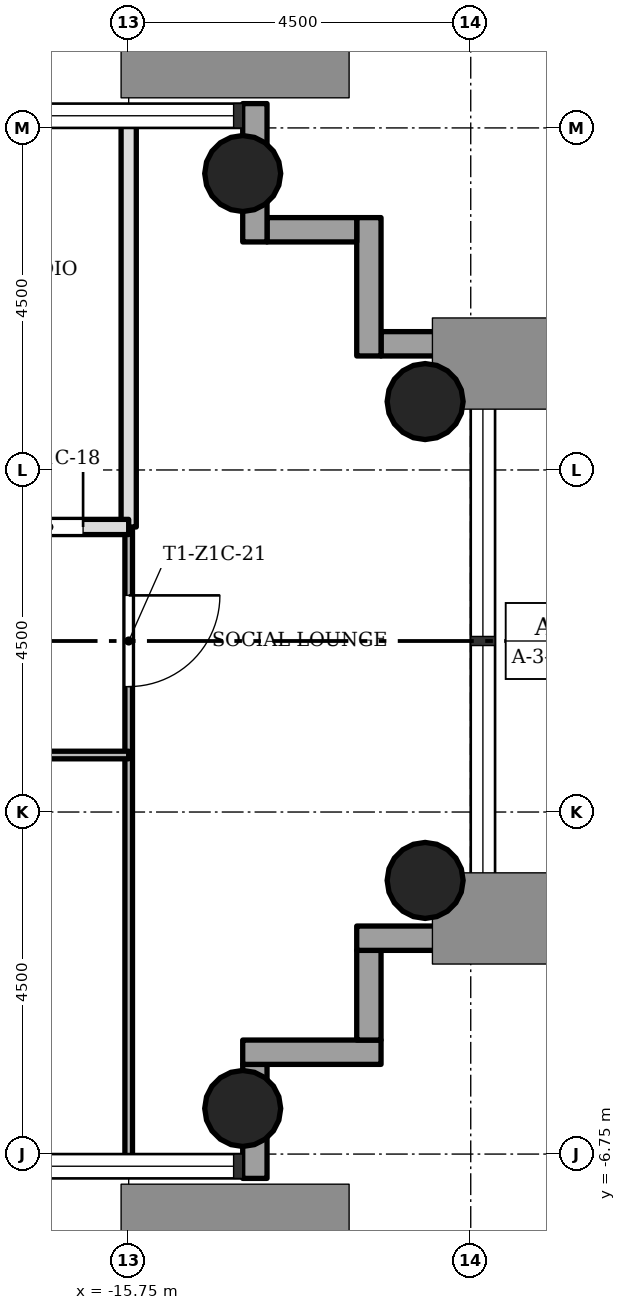
"""IFC4 building model, lengths in metres.
Left out: names, types, materials, properties, quantities, classifications, styles, units other than length and angle.
Written with IfcOpenShell. Run it as: python <this file> out.ifc"""

import sys

from ifc_helpers import new_model, si_unit, direction, frame, frame_2d, origin, origin_2d, place, context, subcontext, project, spatial, rectangle, hollow_circle, extrude, element, fill, save


model = new_model("IFC4")
c1 = context("Model", 3, precision=1e-05, world=origin(), true_north=direction((0.0, 1.0)))
c2 = subcontext(c1, "Body", "Model", "MODEL_VIEW")
j1 = project(units=[si_unit("LENGTHUNIT", "METRE"), si_unit("PLANEANGLEUNIT", "RADIAN")], contexts=[c1])
p1 = place(None, origin())
s1 = spatial("IfcSite", under=j1, at=p1, CompositionType="ELEMENT")
p2 = place(p1, origin())
s2 = spatial("IfcBuilding", under=s1, at=p2, CompositionType="ELEMENT")
p3 = place(p2, frame((0.0, 0.0, 51.7)))
s3 = spatial("IfcBuildingStorey", under=s2, at=p3, CompositionType="ELEMENT", Elevation=51.7)
for number, where, z_axis, x_axis in (
    (1, (-14.25, -6.15, 0.0), (0.0, 0.0, 1.0), (1.0, 0.0, 0.0)),
    (2, (-14.25, 6.15, 0.0), (0.0, 0.0, 1.0), (1.0, 0.0, 0.0)),
    (3, (-11.85, -3.15, 0.0), (0.0, 0.0, 1.0), (1.0, 0.0, 0.0)),
    (4, (-11.85, 3.15, 0.0), (0.0, 0.0, 1.0), (1.0, 0.0, 0.0)),
):
    element("IfcColumn", number, at=place(p3, frame(where, z_axis=z_axis, x_axis=x_axis)), inside=s3, PredefinedType="COLUMN", context=c2, shape_type="SweptSolid", body=[
        extrude(hollow_circle(Radius=0.5, WallThickness=0.036, at=origin_2d()), origin(), (0.0, 0.0, 1.0), 3.4),
    ])
p4 = place(p3, frame((-14.09, -7.07, -0.3), z_axis=(0.0, 0.0, 1.0), x_axis=(0.0, 1.0, 0.0)))
e5 = element("IfcWall", 5, at=p4, inside=s3, PredefinedType="STANDARD", context=c2, shape_type="SweptSolid", body=[
    extrude(rectangle(XDim=1.5, YDim=0.32, at=frame_2d((0.75, 0.0))), origin(), (0.0, 0.0, 1.0), 3.4),
])
p5 = place(p3, frame((-14.25, -5.41, -0.3), z_axis=(0.0, 0.0, 1.0), x_axis=(1.0, 0.0, 0.0)))
e6 = element("IfcWall", 6, at=p5, inside=s3, PredefinedType="STANDARD", context=c2, shape_type="SweptSolid", body=[
    extrude(rectangle(XDim=1.82, YDim=0.32, at=frame_2d((0.91, 0.0))), origin(), (0.0, 0.0, 1.0), 3.4),
])
p6 = place(p3, frame((-12.59, -5.25, -0.3), z_axis=(0.0, 0.0, 1.0), x_axis=(0.0, 1.0, 0.0)))
e7 = element("IfcWall", 7, at=p6, inside=s3, PredefinedType="STANDARD", context=c2, shape_type="SweptSolid", body=[
    extrude(rectangle(XDim=1.18, YDim=0.32, at=frame_2d((0.59, 0.0))), origin(), (0.0, 0.0, 1.0), 3.4),
])
p7 = place(p3, frame((-12.75, -3.91, -0.3), z_axis=(0.0, 0.0, 1.0), x_axis=(1.0, 0.0, 0.0)))
e8 = element("IfcWall", 8, at=p7, inside=s3, PredefinedType="STANDARD", context=c2, shape_type="SweptSolid", body=[
    extrude(rectangle(XDim=1.82, YDim=0.32, at=frame_2d((0.91, 0.0))), origin(), (0.0, 0.0, 1.0), 3.4),
])
p8 = place(p3, frame((-10.93, 3.91, -0.3), z_axis=(0.0, 0.0, 1.0), x_axis=(-1.0, 0.0, 0.0)))
e9 = element("IfcWall", 9, at=p8, inside=s3, PredefinedType="STANDARD", context=c2, shape_type="SweptSolid", body=[
    extrude(rectangle(XDim=1.5, YDim=0.32, at=frame_2d((0.75, 0.0))), origin(), (0.0, 0.0, 1.0), 3.4),
])
p9 = place(p3, frame((-12.59, 3.75, -0.3), z_axis=(0.0, 0.0, 1.0), x_axis=(0.0, 1.0, 0.0)))
e10 = element("IfcWall", 10, at=p9, inside=s3, PredefinedType="STANDARD", context=c2, shape_type="SweptSolid", body=[
    extrude(rectangle(XDim=1.82, YDim=0.32, at=frame_2d((0.91, 0.0))), origin(), (0.0, 0.0, 1.0), 3.4),
])
p10 = place(p3, frame((-12.75, 5.41, -0.3), z_axis=(0.0, 0.0, 1.0), x_axis=(-1.0, 0.0, 0.0)))
e11 = element("IfcWall", 11, at=p10, inside=s3, PredefinedType="STANDARD", context=c2, shape_type="SweptSolid", body=[
    extrude(rectangle(XDim=1.18, YDim=0.32, at=frame_2d((0.59, 0.0))), origin(), (0.0, 0.0, 1.0), 3.4),
])
p11 = place(p3, frame((-14.09, 5.25, -0.3), z_axis=(0.0, 0.0, 1.0), x_axis=(0.0, 1.0, 0.0)))
e12 = element("IfcWall", 12, at=p11, inside=s3, PredefinedType="STANDARD", context=c2, shape_type="SweptSolid", body=[
    extrude(rectangle(XDim=1.82, YDim=0.32, at=frame_2d((0.91, 0.0))), origin(), (0.0, 0.0, 1.0), 3.4),
])
p12 = place(p3, frame((-15.75, -6.85, 0.0), z_axis=(0.0, 0.0, 1.0), x_axis=(0.0, 1.0, 0.0)))
e13 = element("IfcWall", 13, at=p12, inside=s3, PredefinedType="PARTITIONING", context=c2, shape_type="SweptSolid", body=[
    extrude(rectangle(XDim=8.35, YDim=0.1, at=frame_2d((4.175, 0.0))), origin(), (0.0, 0.0, 1.0), 3.0),
])
p13 = place(p12, frame((6.25, 0.0, 0.0)))
e14 = element("IfcOpeningElement", 14, at=p13, cuts=e13, PredefinedType="OPENING", context=c2, shape_type="SweptSolid", body=[
    extrude(rectangle(XDim=1.2, YDim=2.1, at=frame_2d((0.6, 1.05))), frame((0.0, 0.06, 0.0), z_axis=(0.0, -1.0, 0.0), x_axis=(1.0, 0.0, 0.0)), (0.0, 0.0, 1.0), 0.12),
])
p14 = place(p3, frame((-15.75, 1.5, 0.0), z_axis=(0.0, 0.0, 1.0), x_axis=(0.0, 1.0, 0.0)))
e15 = element("IfcWall", 15, at=p14, inside=s3, PredefinedType="SOLIDWALL", context=c2, shape_type="SweptSolid", body=[
    extrude(rectangle(XDim=5.35, YDim=0.2, at=frame_2d((2.675, 0.0))), origin(), (0.0, 0.0, 1.0), 3.0),
])
p15 = place(p3, frame((-20.25, -1.5, 0.0), z_axis=(0.0, 0.0, 1.0), x_axis=(1.0, 0.0, 0.0)))
e16 = element("IfcWall", 16, at=p15, inside=s3, PredefinedType="PARTITIONING", context=c2, shape_type="SweptSolid", body=[
    extrude(rectangle(XDim=4.5, YDim=0.1, at=frame_2d((2.25, 0.0))), origin(), (0.0, 0.0, 1.0), 3.0),
])
p16 = place(p15, frame((1.8, 0.0, 0.0)))
e17 = element("IfcOpeningElement", 17, at=p16, cuts=e16, PredefinedType="OPENING", context=c2, shape_type="SweptSolid", body=[
    extrude(rectangle(XDim=0.9, YDim=2.1, at=frame_2d((0.45, 1.05))), frame((0.0, 0.06, 0.0), z_axis=(0.0, -1.0, 0.0), x_axis=(1.0, 0.0, 0.0)), (0.0, 0.0, 1.0), 0.12),
])
p17 = place(p3, frame((-20.25, 1.5, 0.0), z_axis=(0.0, 0.0, 1.0), x_axis=(1.0, 0.0, 0.0)))
e18 = element("IfcWall", 18, at=p17, inside=s3, PredefinedType="SOLIDWALL", context=c2, shape_type="SweptSolid", body=[
    extrude(rectangle(XDim=4.5, YDim=0.2, at=frame_2d((2.25, 0.0))), origin(), (0.0, 0.0, 1.0), 3.0),
])
p18 = place(p17, frame((3.0, 0.0, 0.0)))
e19 = element("IfcOpeningElement", 19, at=p18, cuts=e18, PredefinedType="OPENING", context=c2, shape_type="SweptSolid", body=[
    extrude(rectangle(XDim=0.9, YDim=2.1, at=frame_2d((0.45, 1.05))), frame((0.0, 0.11, 0.0), z_axis=(0.0, -1.0, 0.0), x_axis=(1.0, 0.0, 0.0)), (0.0, 0.0, 1.0), 0.22),
])
p19 = place(p18, origin())
e20 = element("IfcDoor", 20, at=p19, inside=s3, OperationType="SINGLE_SWING_LEFT", PredefinedType="DOOR", context=c2, shape_type="SweptSolid", body=[
    extrude(rectangle(XDim=0.9, YDim=2.1, at=frame_2d((0.45, 1.05))), frame((0.0, 0.025, 0.0), z_axis=(0.0, -1.0, 0.0), x_axis=(1.0, 0.0, 0.0)), (0.0, 0.0, 1.0), 0.05),
])
fill(e19, e20)
p20 = place(p13, origin())
e21 = element("IfcDoor", 21, at=p20, inside=s3, OperationType="SINGLE_SWING_RIGHT", PredefinedType="DOOR", context=c2, shape_type="SweptSolid", body=[
    extrude(rectangle(XDim=1.2, YDim=2.1, at=frame_2d((0.6, 1.05))), frame((0.0, 0.025, 0.0), z_axis=(0.0, -1.0, 0.0), x_axis=(1.0, 0.0, 0.0)), (0.0, 0.0, 1.0), 0.05),
])
fill(e14, e21)
save(model, sys.argv[1])
